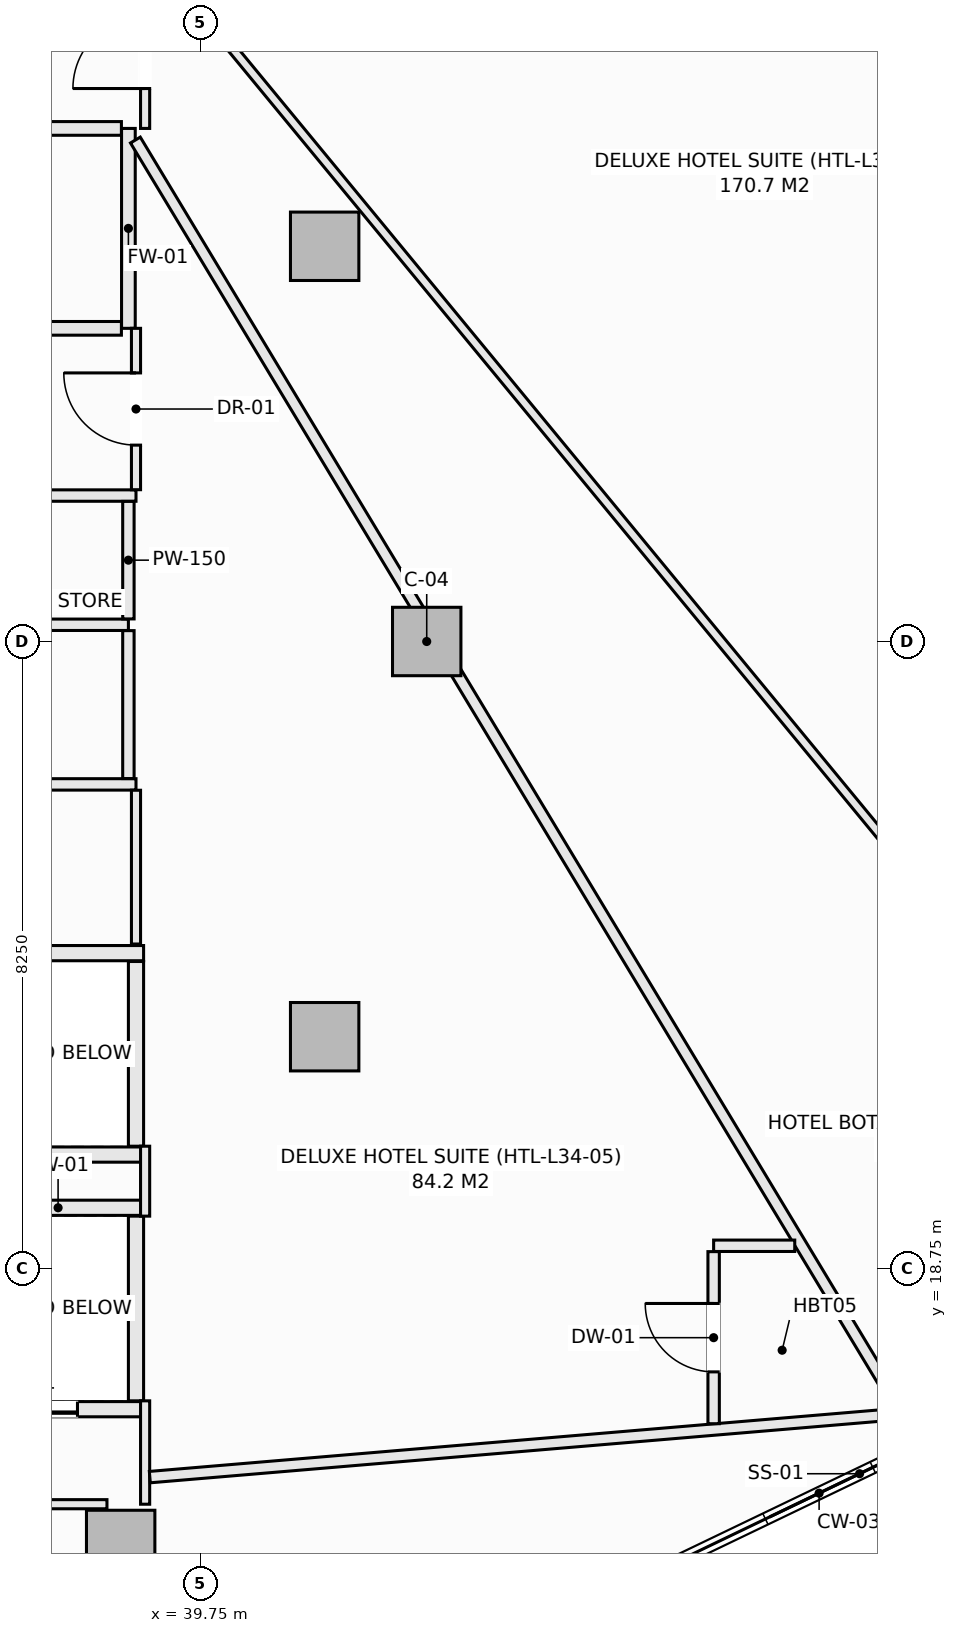
"""IFC4 building model, lengths in metres.
Left out: names, types, materials, properties, quantities, classifications, styles, units other than length and angle.
Written with IfcOpenShell. Run it as: python <this file> out.ifc"""

import sys

from ifc_helpers import new_model, si_unit, direction, frame, frame_2d, origin, origin_2d, place, context, subcontext, project, spatial, rectangle, extrude, element, fill, save


model = new_model("IFC4")
c1 = context("Model", 3, precision=1e-05, world=origin(), true_north=direction((0.0, 1.0)))
c2 = subcontext(c1, "Body", "Model", "MODEL_VIEW")
j1 = project(units=[si_unit("LENGTHUNIT", "METRE"), si_unit("PLANEANGLEUNIT", "RADIAN")], contexts=[c1])
p1 = place(None, origin())
s1 = spatial("IfcSite", under=j1, at=p1, CompositionType="ELEMENT")
p2 = place(p1, origin())
s2 = spatial("IfcBuilding", under=s1, at=p2, CompositionType="ELEMENT")
p3 = place(p2, frame((0.0, 0.0, 135.9)))
s3 = spatial("IfcBuildingStorey", under=s2, at=p3, CompositionType="ELEMENT", Elevation=135.9)
for number, where, z_axis, x_axis in (
    (1, (42.725, 27.0, -0.27), (0.0, 0.0, 1.0), (1.0, 0.0, 0.0)),
    (2, (41.382, 32.199, -0.27), (0.0, 0.0, 1.0), (1.0, 0.0, 0.0)),
    (3, (38.698, 15.121, -0.27), (0.0, 0.0, 1.0), (1.0, 0.0, 0.0)),
    (4, (41.382, 21.801, -0.27), (0.0, 0.0, 1.0), (1.0, 0.0, 0.0)),
):
    element("IfcColumn", number, at=place(p3, frame(where, z_axis=z_axis, x_axis=x_axis)), inside=s3, PredefinedType="COLUMN", context=c2, shape_type="SweptSolid", body=[
        extrude(rectangle(XDim=0.9, YDim=0.9, at=origin_2d()), origin(), (0.0, 0.0, 1.0), 3.4),
    ])
p4 = place(p3, frame((36.75, 19.55, 0.0), z_axis=(0.0, 0.0, 1.0), x_axis=(1.0, 0.0, 0.0)))
e5 = element("IfcWall", 5, at=p4, inside=s3, PredefinedType="SOLIDWALL", context=c2, shape_type="SweptSolid", body=[
    extrude(rectangle(XDim=2.25, YDim=0.2, at=frame_2d((1.125, 0.0))), origin(), (0.0, 0.0, 1.0), 3.13),
])
p5 = place(p3, frame((36.75, 16.9, 0.0), z_axis=(0.0, 0.0, 1.0), x_axis=(1.0, 0.0, 0.0)))
e6 = element("IfcWall", 6, at=p5, inside=s3, PredefinedType="SOLIDWALL", context=c2, shape_type="SweptSolid", body=[
    extrude(rectangle(XDim=2.25, YDim=0.2, at=frame_2d((1.125, 0.0))), origin(), (0.0, 0.0, 1.0), 3.13),
])
p6 = place(p5, frame((0.28, 0.0, 0.0)))
e7 = element("IfcOpeningElement", 7, at=p6, cuts=e6, PredefinedType="OPENING", context=c2, shape_type="SweptSolid", body=[
    extrude(rectangle(XDim=1.1, YDim=2.2, at=frame_2d((0.55, 1.1))), frame((0.0, 0.11, 0.0), z_axis=(0.0, -1.0, 0.0), x_axis=(1.0, 0.0, 0.0)), (0.0, 0.0, 1.0), 0.22),
])
p7 = place(p3, frame((38.9, 17.01, 0.0), z_axis=(0.0, 0.0, 1.0), x_axis=(0.0, 1.0, 0.0)))
e8 = element("IfcWall", 8, at=p7, inside=s3, PredefinedType="SOLIDWALL", context=c2, shape_type="SweptSolid", body=[
    extrude(rectangle(XDim=2.43, YDim=0.2, at=frame_2d((1.215, 0.0))), origin(), (0.0, 0.0, 1.0), 3.13),
])
for number, where, z_axis, x_axis in (
    (9, (36.75, 22.9, 0.0), (0.0, 0.0, 1.0), (1.0, 0.0, 0.0)),
    (10, (36.75, 20.25, 0.0), (0.0, 0.0, 1.0), (1.0, 0.0, 0.0)),
):
    element("IfcWall", number, at=place(p3, frame(where, z_axis=z_axis, x_axis=x_axis)), inside=s3, PredefinedType="SOLIDWALL", context=c2, shape_type="SweptSolid", body=[
        extrude(rectangle(XDim=2.25, YDim=0.2, at=frame_2d((1.125, 0.0))), origin(), (0.0, 0.0, 1.0), 3.13),
    ])
p8 = place(p3, frame((38.9, 20.36, 0.0), z_axis=(0.0, 0.0, 1.0), x_axis=(0.0, 1.0, 0.0)))
e11 = element("IfcWall", 11, at=p8, inside=s3, PredefinedType="SOLIDWALL", context=c2, shape_type="SweptSolid", body=[
    extrude(rectangle(XDim=2.43, YDim=0.2, at=frame_2d((1.215, 0.0))), origin(), (0.0, 0.0, 1.0), 3.13),
])
p9 = place(p3, frame((30.077, 28.92, 0.0), z_axis=(0.0, 0.0, 1.0), x_axis=(1.0, 0.0, 0.0)))
e12 = element("IfcWall", 12, at=p9, inside=s3, PredefinedType="PARTITIONING", context=c2, shape_type="SweptSolid", body=[
    extrude(rectangle(XDim=8.823, YDim=0.15, at=frame_2d((4.412, 0.0))), origin(), (0.0, 0.0, 1.0), 3.13),
])
p10 = place(p9, frame((1.342, 0.0, 0.0)))
e13 = element("IfcOpeningElement", 13, at=p10, cuts=e12, PredefinedType="OPENING", context=c2, shape_type="SweptSolid", body=[
    extrude(rectangle(XDim=0.95, YDim=2.1, at=frame_2d((0.475, 1.05))), frame((0.0, 0.085, 0.0), z_axis=(0.0, -1.0, 0.0), x_axis=(1.0, 0.0, 0.0)), (0.0, 0.0, 1.0), 0.17),
])
p11 = place(p9, frame((5.343, 0.0, 0.0)))
e14 = element("IfcOpeningElement", 14, at=p11, cuts=e12, PredefinedType="OPENING", context=c2, shape_type="SweptSolid", body=[
    extrude(rectangle(XDim=0.95, YDim=2.1, at=frame_2d((0.475, 1.05))), frame((0.0, 0.085, 0.0), z_axis=(0.0, -1.0, 0.0), x_axis=(1.0, 0.0, 0.0)), (0.0, 0.0, 1.0), 0.17),
])
p12 = place(p3, frame((33.377, 25.12, 0.0), z_axis=(0.0, 0.0, 1.0), x_axis=(1.0, 0.0, 0.0)))
e15 = element("IfcWall", 15, at=p12, inside=s3, PredefinedType="PARTITIONING", context=c2, shape_type="SweptSolid", body=[
    extrude(rectangle(XDim=5.523, YDim=0.15, at=frame_2d((2.761, 0.0))), origin(), (0.0, 0.0, 1.0), 3.13),
])
p13 = place(p12, frame((2.287, 0.0, 0.0)))
e16 = element("IfcOpeningElement", 16, at=p13, cuts=e15, PredefinedType="OPENING", context=c2, shape_type="SweptSolid", body=[
    extrude(rectangle(XDim=0.95, YDim=2.1, at=frame_2d((0.475, 1.05))), frame((0.0, 0.085, 0.0), z_axis=(0.0, -1.0, 0.0), x_axis=(1.0, 0.0, 0.0)), (0.0, 0.0, 1.0), 0.17),
])
p14 = place(p3, frame((33.377, 27.22, 0.0), z_axis=(0.0, 0.0, 1.0), x_axis=(1.0, 0.0, 0.0)))
e17 = element("IfcWall", 17, at=p14, inside=s3, PredefinedType="PARTITIONING", context=c2, shape_type="SweptSolid", body=[
    extrude(rectangle(XDim=5.423, YDim=0.15, at=frame_2d((2.711, 0.0))), origin(), (0.0, 0.0, 1.0), 3.13),
])
p15 = place(p3, frame((38.8, 25.197, 0.0), z_axis=(0.0, 0.0, 1.0), x_axis=(0.0, 1.0, 0.0)))
e18 = element("IfcWall", 18, at=p15, inside=s3, PredefinedType="PARTITIONING", context=c2, shape_type="SweptSolid", body=[
    extrude(rectangle(XDim=1.946, YDim=0.15, at=frame_2d((0.973, 0.0))), origin(), (0.0, 0.0, 1.0), 3.13),
])
p16 = place(p3, frame((38.8, 27.297, 0.0), z_axis=(0.0, 0.0, 1.0), x_axis=(0.0, 1.0, 0.0)))
e19 = element("IfcWall", 19, at=p16, inside=s3, PredefinedType="PARTITIONING", context=c2, shape_type="SweptSolid", body=[
    extrude(rectangle(XDim=1.546, YDim=0.15, at=frame_2d((0.773, 0.0))), origin(), (0.0, 0.0, 1.0), 3.13),
])
p17 = place(p3, frame((38.8, 31.12, 0.0), z_axis=(0.0, 0.0, 1.0), x_axis=(0.0, 1.0, 0.0)))
e20 = element("IfcWall", 20, at=p17, inside=s3, PredefinedType="SOLIDWALL", context=c2, shape_type="SweptSolid", body=[
    extrude(rectangle(XDim=2.63, YDim=0.18, at=frame_2d((1.315, 0.0))), origin(), (0.0, 0.0, 1.0), 3.13),
])
p18 = place(p3, frame((30.077, 31.12, 0.0), z_axis=(0.0, 0.0, 1.0), x_axis=(1.0, 0.0, 0.0)))
e21 = element("IfcWall", 21, at=p18, inside=s3, PredefinedType="SOLIDWALL", context=c2, shape_type="SweptSolid", body=[
    extrude(rectangle(XDim=8.631, YDim=0.18, at=frame_2d((4.315, 0.0))), origin(), (0.0, 0.0, 1.0), 3.13),
])
p19 = place(p18, frame((2.592, 0.0, 0.0)))
e22 = element("IfcOpeningElement", 22, at=p19, cuts=e21, PredefinedType="OPENING", context=c2, shape_type="SweptSolid", body=[
    extrude(rectangle(XDim=0.95, YDim=2.1, at=frame_2d((0.475, 1.05))), frame((0.0, 0.1, 0.0), z_axis=(0.0, -1.0, 0.0), x_axis=(1.0, 0.0, 0.0)), (0.0, 0.0, 1.0), 0.2),
])
p20 = place(p18, frame((6.497, 0.0, 0.0)))
e23 = element("IfcOpeningElement", 23, at=p20, cuts=e21, PredefinedType="OPENING", context=c2, shape_type="SweptSolid", body=[
    extrude(rectangle(XDim=0.95, YDim=2.1, at=frame_2d((0.475, 1.05))), frame((0.0, 0.1, 0.0), z_axis=(0.0, -1.0, 0.0), x_axis=(1.0, 0.0, 0.0)), (0.0, 0.0, 1.0), 0.2),
])
p21 = place(p3, frame((30.077, 33.75, 0.0), z_axis=(0.0, 0.0, 1.0), x_axis=(1.0, 0.0, 0.0)))
e24 = element("IfcWall", 24, at=p21, inside=s3, PredefinedType="SOLIDWALL", context=c2, shape_type="SweptSolid", body=[
    extrude(rectangle(XDim=8.631, YDim=0.18, at=frame_2d((4.315, 0.0))), origin(), (0.0, 0.0, 1.0), 3.13),
])
p22 = place(p3, frame((39.02, 15.65, 0.0), z_axis=(0.0, 0.0, 1.0), x_axis=(0.0, 1.0, 0.0)))
e25 = element("IfcWall", 25, at=p22, inside=s3, PredefinedType="PARTITIONING", context=c2, shape_type="SweptSolid", body=[
    extrude(rectangle(XDim=1.36, YDim=0.12, at=frame_2d((0.68, 0.0))), origin(), (0.0, 0.0, 1.0), 2.505),
])
p23 = place(p3, frame((39.02, 19.44, 0.0), z_axis=(0.0, 0.0, 1.0), x_axis=(0.0, 1.0, 0.0)))
e26 = element("IfcWall", 26, at=p23, inside=s3, PredefinedType="PARTITIONING", context=c2, shape_type="SweptSolid", body=[
    extrude(rectangle(XDim=0.92, YDim=0.12, at=frame_2d((0.46, 0.0))), origin(), (0.0, 0.0, 1.0), 3.13),
])
p24 = place(p3, frame((39.02, 33.75, 0.0), z_axis=(0.0, 0.0, 1.0), x_axis=(0.0, 1.0, 0.0)))
e27 = element("IfcWall", 27, at=p24, inside=s3, PredefinedType="PARTITIONING", context=c2, shape_type="SweptSolid", body=[
    extrude(rectangle(XDim=2.0, YDim=0.12, at=frame_2d((1.0, 0.0))), origin(), (0.0, 0.0, 1.0), 3.13),
])
p25 = place(p24, frame((0.525, 0.0, 0.0)))
e28 = element("IfcOpeningElement", 28, at=p25, cuts=e27, PredefinedType="OPENING", context=c2, shape_type="SweptSolid", body=[
    extrude(rectangle(XDim=0.95, YDim=2.1, at=frame_2d((0.475, 1.05))), frame((0.0, 0.07, 0.0), z_axis=(0.0, -1.0, 0.0), x_axis=(1.0, 0.0, 0.0)), (0.0, 0.0, 1.0), 0.14),
])
p26 = place(p3, frame((35.95, 15.65, 0.0), z_axis=(0.0, 0.0, 1.0), x_axis=(1.0, 0.0, 0.0)))
e29 = element("IfcWall", 29, at=p26, inside=s3, PredefinedType="PARTITIONING", context=c2, shape_type="SweptSolid", body=[
    extrude(rectangle(XDim=2.568, YDim=0.12, at=frame_2d((1.284, 0.0))), origin(), (0.0, 0.0, 1.0), 3.13),
])
p27 = place(p3, frame((38.9, 23.02, 0.0), z_axis=(0.0, 0.0, 1.0), x_axis=(0.0, 1.0, 0.0)))
e30 = element("IfcWall", 30, at=p27, inside=s3, PredefinedType="PARTITIONING", context=c2, shape_type="SweptSolid", body=[
    extrude(rectangle(XDim=2.023, YDim=0.12, at=frame_2d((1.011, 0.0))), origin(), (0.0, 0.0, 1.0), 3.13),
])
p28 = place(p3, frame((38.9, 28.997, 0.0), z_axis=(0.0, 0.0, 1.0), x_axis=(0.0, 1.0, 0.0)))
e31 = element("IfcWall", 31, at=p28, inside=s3, PredefinedType="PARTITIONING", context=c2, shape_type="SweptSolid", body=[
    extrude(rectangle(XDim=2.123, YDim=0.12, at=frame_2d((1.062, 0.0))), origin(), (0.0, 0.0, 1.0), 3.13),
])
p29 = place(p28, frame((0.586, 0.0, 0.0)))
e32 = element("IfcOpeningElement", 32, at=p29, cuts=e31, PredefinedType="OPENING", context=c2, shape_type="SweptSolid", body=[
    extrude(rectangle(XDim=0.95, YDim=2.1, at=frame_2d((0.475, 1.05))), frame((0.0, 0.07, 0.0), z_axis=(0.0, -1.0, 0.0), x_axis=(1.0, 0.0, 0.0)), (0.0, 0.0, 1.0), 0.14),
])
p30 = place(p3, frame((39.082, 16.007, 0.0), z_axis=(0.0, 0.0, 1.0), x_axis=(0.996466495788, 0.083991206515, 0.0)))
e33 = element("IfcWall", 33, at=p30, inside=s3, PredefinedType="PARTITIONING", context=c2, shape_type="SweptSolid", body=[
    extrude(rectangle(XDim=10.938, YDim=0.15, at=frame_2d((5.469, 0.0))), origin(), (0.0, 0.0, 1.0), 2.653),
])
p31 = place(p3, frame((38.892, 33.597, 0.0), z_axis=(0.0, 0.0, 1.0), x_axis=(0.516074687683, -0.856543587176, 0.0)))
e34 = element("IfcWall", 34, at=p31, inside=s3, PredefinedType="PARTITIONING", context=c2, shape_type="SweptSolid", body=[
    extrude(rectangle(XDim=19.476, YDim=0.15, at=frame_2d((9.738, 0.0))), origin(), (0.0, 0.0, 1.0), 2.505),
])
p32 = place(p3, frame((46.5, 19.05, 0.0), z_axis=(0.0, 0.0, 1.0), x_axis=(1.0, 0.0, 0.0)))
e35 = element("IfcWall", 35, at=p32, inside=s3, PredefinedType="PARTITIONING", context=c2, shape_type="SweptSolid", body=[
    extrude(rectangle(XDim=1.067, YDim=0.15, at=frame_2d((0.534, 0.0))), origin(), (0.0, 0.0, 1.0), 2.812),
])
p33 = place(p3, frame((46.5, 16.709, 0.0), z_axis=(0.0, 0.0, 1.0), x_axis=(0.0, 1.0, 0.0)))
e36 = element("IfcWall", 36, at=p33, inside=s3, PredefinedType="PARTITIONING", context=c2, shape_type="SweptSolid", body=[
    extrude(rectangle(XDim=2.264, YDim=0.15, at=frame_2d((1.132, 0.0))), origin(), (0.0, 0.0, 1.0), 3.13),
])
p34 = place(p33, frame((0.682, 0.0, 0.0)))
e37 = element("IfcOpeningElement", 37, at=p34, cuts=e36, PredefinedType="OPENING", context=c2, shape_type="SweptSolid", body=[
    extrude(rectangle(XDim=0.9, YDim=2.1, at=frame_2d((0.45, 1.05))), frame((0.0, 0.085, 0.0), z_axis=(0.0, -1.0, 0.0), x_axis=(1.0, 0.0, 0.0)), (0.0, 0.0, 1.0), 0.17),
])
p35 = place(p3, frame((35.479, 40.488, 0.0), z_axis=(0.0, 0.0, 1.0), x_axis=(0.636055982797, -0.771642914014, 0.0)))
e38 = element("IfcWall", 38, at=p35, inside=s3, PredefinedType="PARTITIONING", context=c2, shape_type="SweptSolid", body=[
    extrude(rectangle(XDim=26.473, YDim=0.12, at=frame_2d((13.236, 0.0))), origin(), (0.0, 0.0, 1.0), 2.812),
])
p36 = place(p6, origin())
e39 = element("IfcDoor", 39, at=p36, inside=s3, OperationType="SLIDING_TO_LEFT", PredefinedType="DOOR", context=c2, shape_type="SweptSolid", body=[
    extrude(rectangle(XDim=1.1, YDim=2.2, at=frame_2d((0.55, 1.1))), frame((0.0, 0.025, 0.0), z_axis=(0.0, -1.0, 0.0), x_axis=(1.0, 0.0, 0.0)), (0.0, 0.0, 1.0), 0.05),
])
fill(e7, e39)
p37 = place(p29, origin())
e40 = element("IfcDoor", 40, at=p37, inside=s3, OperationType="SINGLE_SWING_RIGHT", PredefinedType="DOOR", context=c2, shape_type="SweptSolid", body=[
    extrude(rectangle(XDim=0.95, YDim=2.1, at=frame_2d((0.475, 1.05))), frame((0.0, 0.025, 0.0), z_axis=(0.0, -1.0, 0.0), x_axis=(1.0, 0.0, 0.0)), (0.0, 0.0, 1.0), 0.05),
])
fill(e32, e40)
p38 = place(p25, origin())
e41 = element("IfcDoor", 41, at=p38, inside=s3, OperationType="SINGLE_SWING_LEFT", PredefinedType="DOOR", context=c2, shape_type="SweptSolid", body=[
    extrude(rectangle(XDim=0.95, YDim=2.1, at=frame_2d((0.475, 1.05))), frame((0.0, 0.025, 0.0), z_axis=(0.0, -1.0, 0.0), x_axis=(1.0, 0.0, 0.0)), (0.0, 0.0, 1.0), 0.05),
])
fill(e28, e41)
p39 = place(p34, origin())
e42 = element("IfcDoor", 42, at=p39, inside=s3, OperationType="SINGLE_SWING_RIGHT", PredefinedType="DOOR", context=c2, shape_type="SweptSolid", body=[
    extrude(rectangle(XDim=0.9, YDim=2.1, at=frame_2d((0.45, 1.05))), frame((0.0, 0.025, 0.0), z_axis=(0.0, -1.0, 0.0), x_axis=(1.0, 0.0, 0.0)), (0.0, 0.0, 1.0), 0.05),
])
fill(e37, e42)
save(model, sys.argv[1])
